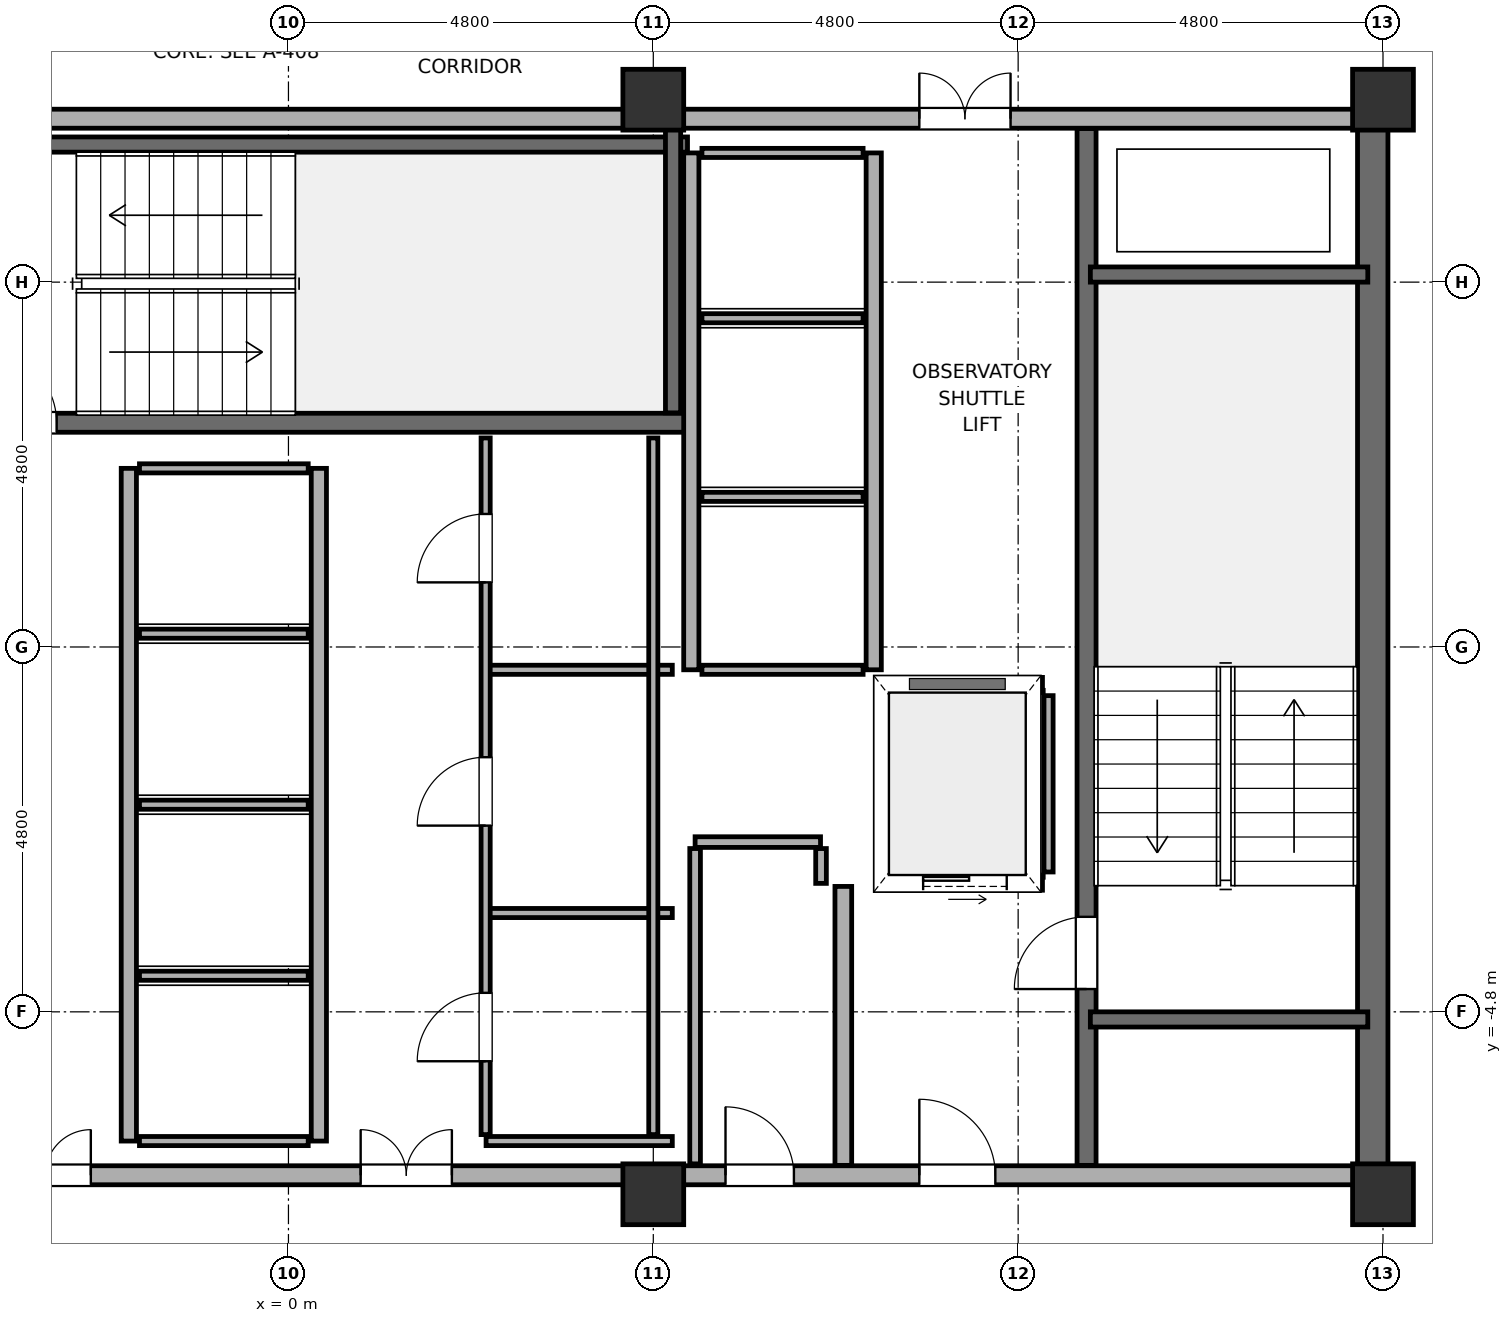
"""IFC4 building model, lengths in metres.
Left out: names, types, materials, properties, quantities, classifications, styles, units other than length and angle.
Written with IfcOpenShell. Run it as: python <this file> out.ifc"""

import sys

from ifc_helpers import new_model, si_unit, direction, frame, frame_2d, origin, origin_2d, place, context, subcontext, project, spatial, rectangle, hollow_rectangle, extrude, element, fill, save


model = new_model("IFC4")
c1 = context("Model", 3, precision=1e-05, world=origin(), true_north=direction((0.0, 1.0)))
c2 = subcontext(c1, "Body", "Model", "MODEL_VIEW")
j1 = project(units=[si_unit("LENGTHUNIT", "METRE"), si_unit("PLANEANGLEUNIT", "RADIAN")], contexts=[c1])
p1 = place(None, origin())
s1 = spatial("IfcSite", under=j1, at=p1, CompositionType="ELEMENT")
p2 = place(p1, origin())
s2 = spatial("IfcBuilding", under=s1, at=p2, CompositionType="ELEMENT")
p3 = place(p2, frame((0.0, 0.0, 85.5)))
s3 = spatial("IfcBuildingStorey", under=s2, at=p3, CompositionType="ELEMENT", Elevation=85.5)
for number, where, z_axis, x_axis in (
    (1, (4.8, -7.2, 0.0), (0.0, 0.0, 1.0), (1.0, 0.0, 0.0)),
    (2, (4.8, 7.2, 0.0), (0.0, 0.0, 1.0), (1.0, 0.0, 0.0)),
    (3, (14.4, -7.2, 0.0), (0.0, 0.0, 1.0), (1.0, 0.0, 0.0)),
    (4, (14.4, 7.2, 0.0), (0.0, 0.0, 1.0), (1.0, 0.0, 0.0)),
):
    element("IfcColumn", number, at=place(p3, frame(where, z_axis=z_axis, x_axis=x_axis)), inside=s3, PredefinedType="COLUMN", context=c2, shape_type="SweptSolid", body=[
        extrude(hollow_rectangle(XDim=0.8, YDim=0.8, WallThickness=0.036, at=origin_2d()), origin(), (0.0, 0.0, 1.0), 3.7),
    ])
p4 = place(p3, frame((14.265, -7.2, -0.18), z_axis=(0.0, 0.0, 1.0), x_axis=(0.0, 1.0, 0.0)))
e5 = element("IfcWall", 5, at=p4, inside=s3, PredefinedType="SHEAR", context=c2, shape_type="SweptSolid", body=[
    extrude(rectangle(XDim=14.4, YDim=0.4, at=frame_2d((7.2, 0.0))), origin(), (0.0, 0.0, 1.0), 3.63),
])
p5 = place(p3, frame((-4.6, -6.95, 0.0), z_axis=(0.0, 0.0, 1.0), x_axis=(1.0, 0.0, 0.0)))
e6 = element("IfcWall", 6, at=p5, inside=s3, PredefinedType="SOLIDWALL", context=c2, shape_type="SweptSolid", body=[
    extrude(rectangle(XDim=9.2, YDim=0.25, at=frame_2d((4.6, 0.0))), origin(), (0.0, 0.0, 1.0), 2.25),
])
p6 = place(p5, frame((0.8, 0.0, 0.0)))
e7 = element("IfcOpeningElement", 7, at=p6, cuts=e6, PredefinedType="OPENING", context=c2, shape_type="SweptSolid", body=[
    extrude(rectangle(XDim=1.2, YDim=2.02, at=frame_2d((0.6, 1.01))), frame((0.0, 0.14, 0.0), z_axis=(0.0, -1.0, 0.0), x_axis=(1.0, 0.0, 0.0)), (0.0, 0.0, 1.0), 0.28),
])
p7 = place(p5, frame((5.55, 0.0, 0.0)))
e8 = element("IfcOpeningElement", 8, at=p7, cuts=e6, PredefinedType="OPENING", context=c2, shape_type="SweptSolid", body=[
    extrude(rectangle(XDim=1.2, YDim=2.02, at=frame_2d((0.6, 1.01))), frame((0.0, 0.14, 0.0), z_axis=(0.0, -1.0, 0.0), x_axis=(1.0, 0.0, 0.0)), (0.0, 0.0, 1.0), 0.28),
])
p8 = place(p3, frame((4.8, -6.95, 0.0), z_axis=(0.0, 0.0, 1.0), x_axis=(1.0, 0.0, 0.0)))
e9 = element("IfcWall", 9, at=p8, inside=s3, PredefinedType="SOLIDWALL", context=c2, shape_type="SweptSolid", body=[
    extrude(rectangle(XDim=9.4, YDim=0.25, at=frame_2d((4.7, 0.0))), origin(), (0.0, 0.0, 1.0), 2.05),
])
p9 = place(p8, frame((3.5, 0.0, 0.0)))
e10 = element("IfcOpeningElement", 10, at=p9, cuts=e9, PredefinedType="OPENING", context=c2, shape_type="SweptSolid", body=[
    extrude(rectangle(XDim=1.0, YDim=2.02, at=frame_2d((0.5, 1.01))), frame((0.0, 0.14, 0.0), z_axis=(0.0, -1.0, 0.0), x_axis=(1.0, 0.0, 0.0)), (0.0, 0.0, 1.0), 0.28),
])
p10 = place(p8, frame((0.95, 0.0, 0.0)))
e11 = element("IfcOpeningElement", 11, at=p10, cuts=e9, PredefinedType="OPENING", context=c2, shape_type="SweptSolid", body=[
    extrude(rectangle(XDim=0.9, YDim=2.02, at=frame_2d((0.45, 1.01))), frame((0.0, 0.14, 0.0), z_axis=(0.0, -1.0, 0.0), x_axis=(1.0, 0.0, 0.0)), (0.0, 0.0, 1.0), 0.28),
])
p11 = place(p3, frame((-4.6, 6.95, 0.0), z_axis=(0.0, 0.0, 1.0), x_axis=(1.0, 0.0, 0.0)))
e12 = element("IfcWall", 12, at=p11, inside=s3, PredefinedType="SOLIDWALL", context=c2, shape_type="SweptSolid", body=[
    extrude(rectangle(XDim=9.2, YDim=0.25, at=frame_2d((4.6, 0.0))), origin(), (0.0, 0.0, 1.0), 2.05),
])
p12 = place(p3, frame((4.8, 6.95, 0.0), z_axis=(0.0, 0.0, 1.0), x_axis=(1.0, 0.0, 0.0)))
e13 = element("IfcWall", 13, at=p12, inside=s3, PredefinedType="SOLIDWALL", context=c2, shape_type="SweptSolid", body=[
    extrude(rectangle(XDim=9.4, YDim=0.25, at=frame_2d((4.7, 0.0))), origin(), (0.0, 0.0, 1.0), 2.05),
])
p13 = place(p12, frame((3.5, 0.0, 0.0)))
e14 = element("IfcOpeningElement", 14, at=p13, cuts=e13, PredefinedType="OPENING", context=c2, shape_type="SweptSolid", body=[
    extrude(rectangle(XDim=1.2, YDim=2.02, at=frame_2d((0.6, 1.01))), frame((0.0, 0.14, 0.0), z_axis=(0.0, -1.0, 0.0), x_axis=(1.0, 0.0, 0.0)), (0.0, 0.0, 1.0), 0.28),
])
p14 = place(p3, frame((7.3, -6.82, 0.0), z_axis=(0.0, 0.0, 1.0), x_axis=(0.0, 1.0, 0.0)))
e15 = element("IfcWall", 15, at=p14, inside=s3, PredefinedType="SOLIDWALL", context=c2, shape_type="SweptSolid", body=[
    extrude(rectangle(XDim=3.67, YDim=0.22, at=frame_2d((1.835, 0.0))), origin(), (0.0, 0.0, 1.0), 2.05),
])
p15 = place(p3, frame((10.5, -6.82, -0.18), z_axis=(0.0, 0.0, 1.0), x_axis=(0.0, 1.0, 0.0)))
e16 = element("IfcWall", 16, at=p15, inside=s3, PredefinedType="SOLIDWALL", context=c2, shape_type="SweptSolid", body=[
    extrude(rectangle(XDim=13.64, YDim=0.25, at=frame_2d((6.82, 0.0))), origin(), (0.0, 0.0, 1.0), 3.63),
])
p16 = place(p15, frame((2.32, 0.0, 0.18)))
e17 = element("IfcOpeningElement", 17, at=p16, cuts=e16, PredefinedType="OPENING", context=c2, shape_type="SweptSolid", body=[
    extrude(rectangle(XDim=0.95, YDim=2.15, at=frame_2d((0.475, 1.075))), frame((0.0, 0.14, 0.0), z_axis=(0.0, -1.0, 0.0), x_axis=(1.0, 0.0, 0.0)), (0.0, 0.0, 1.0), 0.28),
])
for number, where, z_axis, x_axis in (
    (18, (10.55, -4.9, -0.18), (0.0, 0.0, 1.0), (1.0, 0.0, 0.0)),
    (19, (10.55, 4.9, -0.18), (0.0, 0.0, 1.0), (1.0, 0.0, 0.0)),
):
    element("IfcWall", number, at=place(p3, frame(where, z_axis=z_axis, x_axis=x_axis)), inside=s3, PredefinedType="SOLIDWALL", context=c2, shape_type="SweptSolid", body=[
        extrude(rectangle(XDim=3.65, YDim=0.2, at=frame_2d((1.825, 0.0))), origin(), (0.0, 0.0, 1.0), 3.63),
    ])
p17 = place(p3, frame((-4.65, 2.95, -0.18), z_axis=(0.0, 0.0, 1.0), x_axis=(1.0, 0.0, 0.0)))
e20 = element("IfcWall", 20, at=p17, inside=s3, PredefinedType="SOLIDWALL", context=c2, shape_type="SweptSolid", body=[
    extrude(rectangle(XDim=9.9, YDim=0.25, at=frame_2d((4.95, 0.0))), origin(), (0.0, 0.0, 1.0), 3.63),
])
p18 = place(p17, frame((0.65, 0.0, 0.18)))
e21 = element("IfcOpeningElement", 21, at=p18, cuts=e20, PredefinedType="OPENING", context=c2, shape_type="SweptSolid", body=[
    extrude(rectangle(XDim=0.95, YDim=2.15, at=frame_2d((0.475, 1.075))), frame((0.0, 0.14, 0.0), z_axis=(0.0, -1.0, 0.0), x_axis=(1.0, 0.0, 0.0)), (0.0, 0.0, 1.0), 0.28),
])
p19 = place(p3, frame((-4.65, 6.61, -0.18), z_axis=(0.0, 0.0, 1.0), x_axis=(1.0, 0.0, 0.0)))
e22 = element("IfcWall", 22, at=p19, inside=s3, PredefinedType="SOLIDWALL", context=c2, shape_type="SweptSolid", body=[
    extrude(rectangle(XDim=9.9, YDim=0.2, at=frame_2d((4.95, 0.0))), origin(), (0.0, 0.0, 1.0), 3.63),
])
p20 = place(p3, frame((5.06, 3.08, -0.18), z_axis=(0.0, 0.0, 1.0), x_axis=(0.0, 1.0, 0.0)))
e23 = element("IfcWall", 23, at=p20, inside=s3, PredefinedType="SOLIDWALL", context=c2, shape_type="SweptSolid", body=[
    extrude(rectangle(XDim=3.74, YDim=0.2, at=frame_2d((1.87, 0.0))), origin(), (0.0, 0.0, 1.0), 3.63),
])
for number, where, z_axis, x_axis in (
    (24, (-2.1, -6.5, 0.0), (0.0, 0.0, 1.0), (0.0, 1.0, 0.0)),
    (25, (0.4, -6.5, 0.0), (0.0, 0.0, 1.0), (0.0, 1.0, 0.0)),
):
    element("IfcWall", number, at=place(p3, frame(where, z_axis=z_axis, x_axis=x_axis)), inside=s3, PredefinedType="SOLIDWALL", context=c2, shape_type="SweptSolid", body=[
        extrude(rectangle(XDim=8.85, YDim=0.2, at=frame_2d((4.425, 0.0))), origin(), (0.0, 0.0, 1.0), 3.45),
    ])
for number, where, z_axis, x_axis in (
    (26, (-1.96, -6.5, 0.0), (0.0, 0.0, 1.0), (1.0, 0.0, 0.0)),
    (27, (-1.96, -4.325, 0.0), (0.0, 0.0, 1.0), (1.0, 0.0, 0.0)),
    (28, (-1.96, -2.075, 0.0), (0.0, 0.0, 1.0), (1.0, 0.0, 0.0)),
    (29, (-1.96, 0.175, 0.0), (0.0, 0.0, 1.0), (1.0, 0.0, 0.0)),
    (30, (-1.96, 2.35, 0.0), (0.0, 0.0, 1.0), (1.0, 0.0, 0.0)),
):
    element("IfcWall", number, at=place(p3, frame(where, z_axis=z_axis, x_axis=x_axis)), inside=s3, PredefinedType="PARTITIONING", context=c2, shape_type="SweptSolid", body=[
        extrude(rectangle(XDim=2.22, YDim=0.12, at=frame_2d((1.11, 0.0))), origin(), (0.0, 0.0, 1.0), 3.45),
    ])
for number, where, z_axis, x_axis in (
    (31, (7.7, -0.3, 0.0), (0.0, 0.0, 1.0), (0.0, 1.0, 0.0)),
    (32, (5.3, -0.3, 0.0), (0.0, 0.0, 1.0), (0.0, 1.0, 0.0)),
):
    element("IfcWall", number, at=place(p3, frame(where, z_axis=z_axis, x_axis=x_axis)), inside=s3, PredefinedType="SOLIDWALL", context=c2, shape_type="SweptSolid", body=[
        extrude(rectangle(XDim=6.8, YDim=0.2, at=frame_2d((3.4, 0.0))), origin(), (0.0, 0.0, 1.0), 3.45),
    ])
for number, where, z_axis, x_axis in (
    (33, (5.44, -0.3, 0.0), (0.0, 0.0, 1.0), (1.0, 0.0, 0.0)),
    (34, (5.44, 1.975, 0.0), (0.0, 0.0, 1.0), (1.0, 0.0, 0.0)),
    (35, (5.44, 4.325, 0.0), (0.0, 0.0, 1.0), (1.0, 0.0, 0.0)),
    (36, (5.44, 6.5, 0.0), (0.0, 0.0, 1.0), (1.0, 0.0, 0.0)),
):
    element("IfcWall", number, at=place(p3, frame(where, z_axis=z_axis, x_axis=x_axis)), inside=s3, PredefinedType="PARTITIONING", context=c2, shape_type="SweptSolid", body=[
        extrude(rectangle(XDim=2.12, YDim=0.12, at=frame_2d((1.06, 0.0))), origin(), (0.0, 0.0, 1.0), 3.45),
    ])
p21 = place(p3, frame((7.88, -3.1, 0.0), z_axis=(0.0, 0.0, 1.0), x_axis=(1.0, 0.0, 0.0)))
e37 = element("IfcWall", 37, at=p21, inside=s3, PredefinedType="SOLIDWALL", context=c2, shape_type="SweptSolid", body=[
    extrude(rectangle(XDim=2.04, YDim=0.2, at=frame_2d((1.02, 0.0))), origin(), (0.0, 0.0, 1.0), 3.45),
])
p22 = place(p21, frame((0.47, 0.0, 0.0)))
e38 = element("IfcOpeningElement", 38, at=p22, cuts=e37, PredefinedType="OPENING", context=c2, shape_type="SweptSolid", body=[
    extrude(rectangle(XDim=1.1, YDim=2.2, at=frame_2d((0.55, 1.1))), frame((0.0, 0.115, 0.0), z_axis=(0.0, -1.0, 0.0), x_axis=(1.0, 0.0, 0.0)), (0.0, 0.0, 1.0), 0.23),
])
p23 = place(p3, frame((7.88, -0.5, 0.0), z_axis=(0.0, 0.0, 1.0), x_axis=(1.0, 0.0, 0.0)))
e39 = element("IfcWall", 39, at=p23, inside=s3, PredefinedType="SOLIDWALL", context=c2, shape_type="SweptSolid", body=[
    extrude(rectangle(XDim=2.04, YDim=0.2, at=frame_2d((1.02, 0.0))), origin(), (0.0, 0.0, 1.0), 3.45),
])
for number, where, z_axis, x_axis in (
    (40, (7.8, -2.96, 0.0), (0.0, 0.0, 1.0), (0.0, 1.0, 0.0)),
    (41, (10.0, -2.96, 0.0), (0.0, 0.0, 1.0), (0.0, 1.0, 0.0)),
):
    element("IfcWall", number, at=place(p3, frame(where, z_axis=z_axis, x_axis=x_axis)), inside=s3, PredefinedType="PARTITIONING", context=c2, shape_type="SweptSolid", body=[
        extrude(rectangle(XDim=2.32, YDim=0.12, at=frame_2d((1.16, 0.0))), origin(), (0.0, 0.0, 1.0), 3.45),
    ])
for number, where, z_axis, x_axis in (
    (42, (2.6, -6.5, 0.0), (0.0, 0.0, 1.0), (1.0, 0.0, 0.0)),
    (43, (2.6, -3.5, 0.0), (0.0, 0.0, 1.0), (1.0, 0.0, 0.0)),
):
    element("IfcWall", number, at=place(p3, frame(where, z_axis=z_axis, x_axis=x_axis)), inside=s3, PredefinedType="PARTITIONING", context=c2, shape_type="SweptSolid", body=[
        extrude(rectangle(XDim=2.45, YDim=0.12, at=frame_2d((1.225, 0.0))), origin(), (0.0, 0.0, 1.0), 3.45),
    ])
p24 = place(p3, frame((5.35, -2.567, 0.0), z_axis=(0.0, 0.0, 1.0), x_axis=(1.0, 0.0, 0.0)))
e44 = element("IfcWall", 44, at=p24, inside=s3, PredefinedType="PLUMBINGWALL", context=c2, shape_type="SweptSolid", body=[
    extrude(rectangle(XDim=1.65, YDim=0.14, at=frame_2d((0.825, 0.0))), origin(), (0.0, 0.0, 1.0), 3.45),
])
p25 = place(p3, frame((2.6, -0.3, 0.0), z_axis=(0.0, 0.0, 1.0), x_axis=(1.0, 0.0, 0.0)))
e45 = element("IfcWall", 45, at=p25, inside=s3, PredefinedType="PARTITIONING", context=c2, shape_type="SweptSolid", body=[
    extrude(rectangle(XDim=2.45, YDim=0.12, at=frame_2d((1.225, 0.0))), origin(), (0.0, 0.0, 1.0), 3.45),
])
p26 = place(p3, frame((2.594, -6.415, 0.0), z_axis=(0.0, 0.0, 1.0), x_axis=(0.0, 1.0, 0.0)))
e46 = element("IfcWall", 46, at=p26, inside=s3, PredefinedType="PARTITIONING", context=c2, shape_type="SweptSolid", body=[
    extrude(rectangle(XDim=9.165, YDim=0.12, at=frame_2d((4.583, 0.0))), origin(), (0.0, 0.0, 1.0), 3.45),
])
p27 = place(p26, frame((0.965, 0.0, 0.0)))
e47 = element("IfcOpeningElement", 47, at=p27, cuts=e46, PredefinedType="OPENING", context=c2, shape_type="SweptSolid", body=[
    extrude(rectangle(XDim=0.9, YDim=2.1, at=frame_2d((0.45, 1.05))), frame((0.0, 0.075, 0.0), z_axis=(0.0, -1.0, 0.0), x_axis=(1.0, 0.0, 0.0)), (0.0, 0.0, 1.0), 0.15),
])
p28 = place(p26, frame((4.065, 0.0, 0.0)))
e48 = element("IfcOpeningElement", 48, at=p28, cuts=e46, PredefinedType="OPENING", context=c2, shape_type="SweptSolid", body=[
    extrude(rectangle(XDim=0.9, YDim=2.1, at=frame_2d((0.45, 1.05))), frame((0.0, 0.075, 0.0), z_axis=(0.0, -1.0, 0.0), x_axis=(1.0, 0.0, 0.0)), (0.0, 0.0, 1.0), 0.15),
])
p29 = place(p26, frame((7.265, 0.0, 0.0)))
e49 = element("IfcOpeningElement", 49, at=p29, cuts=e46, PredefinedType="OPENING", context=c2, shape_type="SweptSolid", body=[
    extrude(rectangle(XDim=0.9, YDim=2.1, at=frame_2d((0.45, 1.05))), frame((0.0, 0.075, 0.0), z_axis=(0.0, -1.0, 0.0), x_axis=(1.0, 0.0, 0.0)), (0.0, 0.0, 1.0), 0.15),
])
p30 = place(p3, frame((4.8, -6.415, 0.0), z_axis=(0.0, 0.0, 1.0), x_axis=(0.0, 1.0, 0.0)))
e50 = element("IfcWall", 50, at=p30, inside=s3, PredefinedType="PARTITIONING", context=c2, shape_type="SweptSolid", body=[
    extrude(rectangle(XDim=9.165, YDim=0.12, at=frame_2d((4.583, 0.0))), origin(), (0.0, 0.0, 1.0), 3.45),
])
p31 = place(p3, frame((5.35, -6.8, 0.0), z_axis=(0.0, 0.0, 1.0), x_axis=(0.0, 1.0, 0.0)))
e51 = element("IfcWall", 51, at=p31, inside=s3, PredefinedType="PLUMBINGWALL", context=c2, shape_type="SweptSolid", body=[
    extrude(rectangle(XDim=4.148, YDim=0.14, at=frame_2d((2.074, 0.0))), origin(), (0.0, 0.0, 1.0), 2.05),
])
p32 = place(p3, frame((7.007, -3.11, 0.0), z_axis=(0.0, 0.0, 1.0), x_axis=(0.0, 1.0, 0.0)))
e52 = element("IfcWall", 52, at=p32, inside=s3, PredefinedType="PLUMBINGWALL", context=c2, shape_type="SweptSolid", body=[
    extrude(rectangle(XDim=0.458, YDim=0.14, at=frame_2d((0.229, 0.0))), origin(), (0.0, 0.0, 1.0), 3.45),
])
p33 = place(p9, origin())
e53 = element("IfcDoor", 53, at=p33, inside=s3, OperationType="SINGLE_SWING_RIGHT", PredefinedType="DOOR", context=c2, shape_type="SweptSolid", body=[
    extrude(rectangle(XDim=1.0, YDim=2.02, at=frame_2d((0.5, 1.01))), frame((0.0, 0.025, 0.0), z_axis=(0.0, -1.0, 0.0), x_axis=(1.0, 0.0, 0.0)), (0.0, 0.0, 1.0), 0.05),
])
fill(e10, e53)
p34 = place(p6, origin())
e54 = element("IfcDoor", 54, at=p34, inside=s3, OperationType="DOUBLE_DOOR_SINGLE_SWING", PredefinedType="DOOR", context=c2, shape_type="SweptSolid", body=[
    extrude(rectangle(XDim=1.2, YDim=2.02, at=frame_2d((0.6, 1.01))), frame((0.0, 0.025, 0.0), z_axis=(0.0, -1.0, 0.0), x_axis=(1.0, 0.0, 0.0)), (0.0, 0.0, 1.0), 0.05),
])
fill(e7, e54)
p35 = place(p7, origin())
e55 = element("IfcDoor", 55, at=p35, inside=s3, OperationType="DOUBLE_DOOR_SINGLE_SWING", PredefinedType="DOOR", context=c2, shape_type="SweptSolid", body=[
    extrude(rectangle(XDim=1.2, YDim=2.02, at=frame_2d((0.6, 1.01))), frame((0.0, 0.025, 0.0), z_axis=(0.0, -1.0, 0.0), x_axis=(1.0, 0.0, 0.0)), (0.0, 0.0, 1.0), 0.05),
])
fill(e8, e55)
p36 = place(p13, origin())
e56 = element("IfcDoor", 56, at=p36, inside=s3, OperationType="DOUBLE_DOOR_SINGLE_SWING", PredefinedType="DOOR", context=c2, shape_type="SweptSolid", body=[
    extrude(rectangle(XDim=1.2, YDim=2.02, at=frame_2d((0.6, 1.01))), frame((0.0, 0.025, 0.0), z_axis=(0.0, -1.0, 0.0), x_axis=(1.0, 0.0, 0.0)), (0.0, 0.0, 1.0), 0.05),
])
fill(e14, e56)
p37 = place(p16, origin())
e57 = element("IfcDoor", 57, at=p37, inside=s3, OperationType="SINGLE_SWING_LEFT", PredefinedType="DOOR", context=c2, shape_type="SweptSolid", body=[
    extrude(rectangle(XDim=0.95, YDim=2.15, at=frame_2d((0.475, 1.075))), frame((0.0, 0.025, 0.0), z_axis=(0.0, -1.0, 0.0), x_axis=(1.0, 0.0, 0.0)), (0.0, 0.0, 1.0), 0.05),
])
fill(e17, e57)
p38 = place(p18, origin())
e58 = element("IfcDoor", 58, at=p38, inside=s3, OperationType="SINGLE_SWING_RIGHT", PredefinedType="DOOR", context=c2, shape_type="SweptSolid", body=[
    extrude(rectangle(XDim=0.95, YDim=2.15, at=frame_2d((0.475, 1.075))), frame((0.0, 0.025, 0.0), z_axis=(0.0, -1.0, 0.0), x_axis=(1.0, 0.0, 0.0)), (0.0, 0.0, 1.0), 0.05),
])
fill(e21, e58)
p39 = place(p22, origin())
e59 = element("IfcDoor", 59, at=p39, inside=s3, OperationType="SLIDING_TO_LEFT", PredefinedType="DOOR", context=c2, shape_type="SweptSolid", body=[
    extrude(rectangle(XDim=1.1, YDim=2.2, at=frame_2d((0.55, 1.1))), frame((0.0, 0.025, 0.0), z_axis=(0.0, -1.0, 0.0), x_axis=(1.0, 0.0, 0.0)), (0.0, 0.0, 1.0), 0.05),
])
fill(e38, e59)
p40 = place(p27, origin())
e60 = element("IfcDoor", 60, at=p40, inside=s3, OperationType="SINGLE_SWING_RIGHT", PredefinedType="DOOR", context=c2, shape_type="SweptSolid", body=[
    extrude(rectangle(XDim=0.9, YDim=2.1, at=frame_2d((0.45, 1.05))), frame((0.0, 0.025, 0.0), z_axis=(0.0, -1.0, 0.0), x_axis=(1.0, 0.0, 0.0)), (0.0, 0.0, 1.0), 0.05),
])
fill(e47, e60)
p41 = place(p28, origin())
e61 = element("IfcDoor", 61, at=p41, inside=s3, OperationType="SINGLE_SWING_LEFT", PredefinedType="DOOR", context=c2, shape_type="SweptSolid", body=[
    extrude(rectangle(XDim=0.9, YDim=2.1, at=frame_2d((0.45, 1.05))), frame((0.0, 0.025, 0.0), z_axis=(0.0, -1.0, 0.0), x_axis=(1.0, 0.0, 0.0)), (0.0, 0.0, 1.0), 0.05),
])
fill(e48, e61)
p42 = place(p29, origin())
e62 = element("IfcDoor", 62, at=p42, inside=s3, OperationType="SINGLE_SWING_LEFT", PredefinedType="DOOR", context=c2, shape_type="SweptSolid", body=[
    extrude(rectangle(XDim=0.9, YDim=2.1, at=frame_2d((0.45, 1.05))), frame((0.0, 0.025, 0.0), z_axis=(0.0, -1.0, 0.0), x_axis=(1.0, 0.0, 0.0)), (0.0, 0.0, 1.0), 0.05),
])
fill(e49, e62)
p43 = place(p10, origin())
e63 = element("IfcDoor", 63, at=p43, inside=s3, OperationType="SINGLE_SWING_RIGHT", PredefinedType="DOOR", context=c2, shape_type="SweptSolid", body=[
    extrude(rectangle(XDim=0.9, YDim=2.02, at=frame_2d((0.45, 1.01))), frame((0.0, 0.025, 0.0), z_axis=(0.0, -1.0, 0.0), x_axis=(1.0, 0.0, 0.0)), (0.0, 0.0, 1.0), 0.05),
])
fill(e11, e63)
save(model, sys.argv[1])
